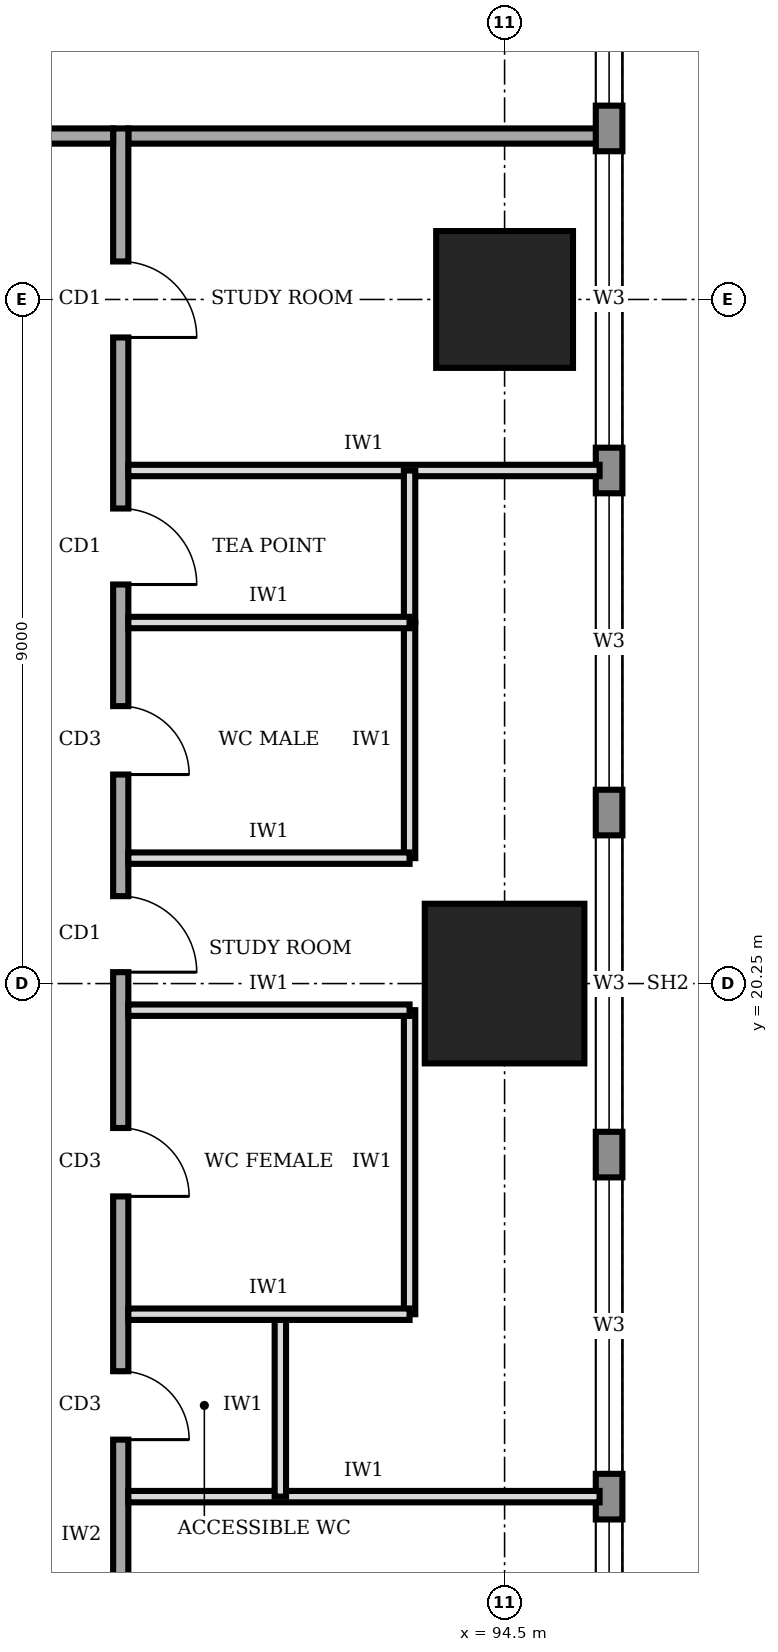
"""IFC4 building model, lengths in metres.
Left out: names, types, materials, properties, quantities, classifications, styles, units other than length and angle.
Written with IfcOpenShell. Run it as: python <this file> out.ifc"""

import sys

from ifc_helpers import new_model, si_unit, direction, frame, frame_2d, origin, origin_2d, place, context, subcontext, project, spatial, rectangle, extrude, element, fill, save


model = new_model("IFC4")
c1 = context("Model", 3, precision=1e-05, world=origin(), true_north=direction((0.0, 1.0)))
c2 = subcontext(c1, "Body", "Model", "MODEL_VIEW")
j1 = project(units=[si_unit("LENGTHUNIT", "METRE"), si_unit("PLANEANGLEUNIT", "RADIAN")], contexts=[c1])
p1 = place(None, origin())
s1 = spatial("IfcSite", under=j1, at=p1, CompositionType="ELEMENT")
p2 = place(p1, origin())
s2 = spatial("IfcBuilding", under=s1, at=p2, CompositionType="ELEMENT")
p3 = place(p2, frame((0.0, 0.0, 201.0)))
s3 = spatial("IfcBuildingStorey", under=s2, at=p3, CompositionType="ELEMENT", Elevation=201.0)
p4 = place(p3, frame((94.5, 20.25, 0.0), z_axis=(0.0, 0.0, 1.0), x_axis=(1.0, 0.0, 0.0)))
e1 = element("IfcColumn", 1, at=p4, inside=s3, PredefinedType="COLUMN", context=c2, shape_type="SweptSolid", body=[
    extrude(rectangle(XDim=2.1, YDim=2.1, at=origin_2d()), origin(), (0.0, 0.0, 1.0), 4.0),
])
p5 = place(p3, frame((94.5, 29.25, 0.0), z_axis=(0.0, 0.0, 1.0), x_axis=(1.0, 0.0, 0.0)))
e2 = element("IfcColumn", 2, at=p5, inside=s3, PredefinedType="COLUMN", context=c2, shape_type="SweptSolid", body=[
    extrude(rectangle(XDim=1.8, YDim=1.8, at=origin_2d()), origin(), (0.0, 0.0, 1.0), 4.0),
])
p6 = place(p3, frame((95.875, 3.32, 0.0), z_axis=(0.0, 0.0, 1.0), x_axis=(0.0, 1.0, 0.0)))
e3 = element("IfcWall", 3, at=p6, inside=s3, PredefinedType="STANDARD", context=c2, shape_type="SweptSolid", body=[
    extrude(rectangle(XDim=33.86, YDim=0.35, at=frame_2d((16.93, 0.0))), origin(), (0.0, 0.0, 1.0), 3.75),
])
p7 = place(p6, frame((1.48, 0.0, 0.95)))
e4 = element("IfcOpeningElement", 4, at=p7, cuts=e3, PredefinedType="OPENING", context=c2, shape_type="SweptSolid", body=[
    extrude(rectangle(XDim=3.9, YDim=1.8, at=frame_2d((1.95, 0.9))), frame((0.0, 0.185, 0.0), z_axis=(0.0, -1.0, 0.0), x_axis=(1.0, 0.0, 0.0)), (0.0, 0.0, 1.0), 0.37),
])
p8 = place(p6, frame((5.98, 0.0, 0.95)))
e5 = element("IfcOpeningElement", 5, at=p8, cuts=e3, PredefinedType="OPENING", context=c2, shape_type="SweptSolid", body=[
    extrude(rectangle(XDim=3.9, YDim=1.8, at=frame_2d((1.95, 0.9))), frame((0.0, 0.185, 0.0), z_axis=(0.0, -1.0, 0.0), x_axis=(1.0, 0.0, 0.0)), (0.0, 0.0, 1.0), 0.37),
])
p9 = place(p6, frame((10.48, 0.0, 0.95)))
e6 = element("IfcOpeningElement", 6, at=p9, cuts=e3, PredefinedType="OPENING", context=c2, shape_type="SweptSolid", body=[
    extrude(rectangle(XDim=3.9, YDim=1.8, at=frame_2d((1.95, 0.9))), frame((0.0, 0.185, 0.0), z_axis=(0.0, -1.0, 0.0), x_axis=(1.0, 0.0, 0.0)), (0.0, 0.0, 1.0), 0.37),
])
p10 = place(p6, frame((14.98, 0.0, 0.95)))
e7 = element("IfcOpeningElement", 7, at=p10, cuts=e3, PredefinedType="OPENING", context=c2, shape_type="SweptSolid", body=[
    extrude(rectangle(XDim=3.9, YDim=1.8, at=frame_2d((1.95, 0.9))), frame((0.0, 0.185, 0.0), z_axis=(0.0, -1.0, 0.0), x_axis=(1.0, 0.0, 0.0)), (0.0, 0.0, 1.0), 0.37),
])
p11 = place(p6, frame((19.48, 0.0, 0.95)))
e8 = element("IfcOpeningElement", 8, at=p11, cuts=e3, PredefinedType="OPENING", context=c2, shape_type="SweptSolid", body=[
    extrude(rectangle(XDim=3.9, YDim=1.8, at=frame_2d((1.95, 0.9))), frame((0.0, 0.185, 0.0), z_axis=(0.0, -1.0, 0.0), x_axis=(1.0, 0.0, 0.0)), (0.0, 0.0, 1.0), 0.37),
])
p12 = place(p6, frame((23.98, 0.0, 0.95)))
e9 = element("IfcOpeningElement", 9, at=p12, cuts=e3, PredefinedType="OPENING", context=c2, shape_type="SweptSolid", body=[
    extrude(rectangle(XDim=3.9, YDim=1.8, at=frame_2d((1.95, 0.9))), frame((0.0, 0.185, 0.0), z_axis=(0.0, -1.0, 0.0), x_axis=(1.0, 0.0, 0.0)), (0.0, 0.0, 1.0), 0.37),
])
p13 = place(p6, frame((28.48, 0.0, 0.95)))
e10 = element("IfcOpeningElement", 10, at=p13, cuts=e3, PredefinedType="OPENING", context=c2, shape_type="SweptSolid", body=[
    extrude(rectangle(XDim=3.9, YDim=1.8, at=frame_2d((1.95, 0.9))), frame((0.0, 0.185, 0.0), z_axis=(0.0, -1.0, 0.0), x_axis=(1.0, 0.0, 0.0)), (0.0, 0.0, 1.0), 0.37),
])
p14 = place(p3, frame((89.45, 9.2, 0.0), z_axis=(0.0, 0.0, 1.0), x_axis=(0.0, 1.0, 0.0)))
e11 = element("IfcWall", 11, at=p14, inside=s3, PredefinedType="SOLIDWALL", context=c2, shape_type="SweptSolid", body=[
    extrude(rectangle(XDim=22.3, YDim=0.2, at=frame_2d((11.15, 0.0))), origin(), (0.0, 0.0, 1.0), 3.75),
])
p15 = place(p14, frame((1.55, 0.0, 0.0)))
e12 = element("IfcOpeningElement", 12, at=p15, cuts=e11, PredefinedType="OPENING", context=c2, shape_type="SweptSolid", body=[
    extrude(rectangle(XDim=1.0, YDim=2.1, at=frame_2d((0.5, 1.05))), frame((0.0, 0.11, 0.0), z_axis=(0.0, -1.0, 0.0), x_axis=(1.0, 0.0, 0.0)), (0.0, 0.0, 1.0), 0.22),
])
p16 = place(p14, frame((5.05, 0.0, 0.0)))
e13 = element("IfcOpeningElement", 13, at=p16, cuts=e11, PredefinedType="OPENING", context=c2, shape_type="SweptSolid", body=[
    extrude(rectangle(XDim=0.9, YDim=2.1, at=frame_2d((0.45, 1.05))), frame((0.0, 0.11, 0.0), z_axis=(0.0, -1.0, 0.0), x_axis=(1.0, 0.0, 0.0)), (0.0, 0.0, 1.0), 0.22),
])
p17 = place(p14, frame((8.25, 0.0, 0.0)))
e14 = element("IfcOpeningElement", 14, at=p17, cuts=e11, PredefinedType="OPENING", context=c2, shape_type="SweptSolid", body=[
    extrude(rectangle(XDim=0.9, YDim=2.1, at=frame_2d((0.45, 1.05))), frame((0.0, 0.11, 0.0), z_axis=(0.0, -1.0, 0.0), x_axis=(1.0, 0.0, 0.0)), (0.0, 0.0, 1.0), 0.22),
])
p18 = place(p14, frame((13.8, 0.0, 0.0)))
e15 = element("IfcOpeningElement", 15, at=p18, cuts=e11, PredefinedType="OPENING", context=c2, shape_type="SweptSolid", body=[
    extrude(rectangle(XDim=0.9, YDim=2.1, at=frame_2d((0.45, 1.05))), frame((0.0, 0.11, 0.0), z_axis=(0.0, -1.0, 0.0), x_axis=(1.0, 0.0, 0.0)), (0.0, 0.0, 1.0), 0.22),
])
p19 = place(p14, frame((16.3, 0.0, 0.0)))
e16 = element("IfcOpeningElement", 16, at=p19, cuts=e11, PredefinedType="OPENING", context=c2, shape_type="SweptSolid", body=[
    extrude(rectangle(XDim=1.0, YDim=2.1, at=frame_2d((0.5, 1.05))), frame((0.0, 0.11, 0.0), z_axis=(0.0, -1.0, 0.0), x_axis=(1.0, 0.0, 0.0)), (0.0, 0.0, 1.0), 0.22),
])
p20 = place(p14, frame((11.2, 0.0, 0.0)))
e17 = element("IfcOpeningElement", 17, at=p20, cuts=e11, PredefinedType="OPENING", context=c2, shape_type="SweptSolid", body=[
    extrude(rectangle(XDim=1.0, YDim=2.1, at=frame_2d((0.5, 1.05))), frame((0.0, 0.11, 0.0), z_axis=(0.0, -1.0, 0.0), x_axis=(1.0, 0.0, 0.0)), (0.0, 0.0, 1.0), 0.22),
])
p21 = place(p14, frame((19.55, 0.0, 0.0)))
e18 = element("IfcOpeningElement", 18, at=p21, cuts=e11, PredefinedType="OPENING", context=c2, shape_type="SweptSolid", body=[
    extrude(rectangle(XDim=1.0, YDim=2.1, at=frame_2d((0.5, 1.05))), frame((0.0, 0.11, 0.0), z_axis=(0.0, -1.0, 0.0), x_axis=(1.0, 0.0, 0.0)), (0.0, 0.0, 1.0), 0.22),
])
p22 = place(p3, frame((89.35, 31.4, 0.0), z_axis=(0.0, 0.0, 1.0), x_axis=(-1.0, 0.0, 0.0)))
e19 = element("IfcWall", 19, at=p22, inside=s3, PredefinedType="SOLIDWALL", context=c2, shape_type="SweptSolid", body=[
    extrude(rectangle(XDim=16.9, YDim=0.2, at=frame_2d((8.45, 0.0))), origin(), (0.0, 0.0, 1.0), 3.75),
])
p23 = place(p22, frame((12.125, 0.0, 0.0)))
e20 = element("IfcOpeningElement", 20, at=p23, cuts=e19, PredefinedType="OPENING", context=c2, shape_type="SweptSolid", body=[
    extrude(rectangle(XDim=1.0, YDim=2.1, at=frame_2d((0.5, 1.05))), frame((0.0, 0.11, 0.0), z_axis=(0.0, -1.0, 0.0), x_axis=(1.0, 0.0, 0.0)), (0.0, 0.0, 1.0), 0.22),
])
p24 = place(p22, frame((5.6, 0.0, 0.0)))
e21 = element("IfcOpeningElement", 21, at=p24, cuts=e19, PredefinedType="OPENING", context=c2, shape_type="SweptSolid", body=[
    extrude(rectangle(XDim=1.0, YDim=2.1, at=frame_2d((0.5, 1.05))), frame((0.0, 0.11, 0.0), z_axis=(0.0, -1.0, 0.0), x_axis=(1.0, 0.0, 0.0)), (0.0, 0.0, 1.0), 0.22),
])
p25 = place(p22, frame((1.325, 0.0, 0.0)))
e22 = element("IfcOpeningElement", 22, at=p25, cuts=e19, PredefinedType="OPENING", context=c2, shape_type="SweptSolid", body=[
    extrude(rectangle(XDim=1.0, YDim=2.1, at=frame_2d((0.5, 1.05))), frame((0.0, 0.11, 0.0), z_axis=(0.0, -1.0, 0.0), x_axis=(1.0, 0.0, 0.0)), (0.0, 0.0, 1.0), 0.22),
])
p26 = place(p3, frame((89.55, 31.4, 0.0), z_axis=(0.0, 0.0, 1.0), x_axis=(1.0, 0.0, 0.0)))
e23 = element("IfcWall", 23, at=p26, inside=s3, PredefinedType="SOLIDWALL", context=c2, shape_type="SweptSolid", body=[
    extrude(rectangle(XDim=6.2, YDim=0.2, at=frame_2d((3.1, 0.0))), origin(), (0.0, 0.0, 1.0), 3.75),
])
for number, where, z_axis, x_axis in (
    (24, (89.55, 13.5, 0.0), (0.0, 0.0, 1.0), (1.0, 0.0, 0.0)),
    (25, (89.55, 27.0, 0.0), (0.0, 0.0, 1.0), (1.0, 0.0, 0.0)),
):
    element("IfcWall", number, at=place(p3, frame(where, z_axis=z_axis, x_axis=x_axis)), inside=s3, PredefinedType="PARTITIONING", context=c2, shape_type="SweptSolid", body=[
        extrude(rectangle(XDim=6.2, YDim=0.15, at=frame_2d((3.1, 0.0))), origin(), (0.0, 0.0, 1.0), 3.75),
    ])
p27 = place(p3, frame((89.55, 15.9, 0.0), z_axis=(0.0, 0.0, 1.0), x_axis=(1.0, 0.0, 0.0)))
e26 = element("IfcWall", 26, at=p27, inside=s3, PredefinedType="PARTITIONING", context=c2, shape_type="SweptSolid", body=[
    extrude(rectangle(XDim=3.7, YDim=0.15, at=frame_2d((1.85, 0.0))), origin(), (0.0, 0.0, 1.0), 3.75),
])
p28 = place(p3, frame((89.55, 19.9, 0.0), z_axis=(0.0, 0.0, 1.0), x_axis=(1.0, 0.0, 0.0)))
e27 = element("IfcWall", 27, at=p28, inside=s3, PredefinedType="PARTITIONING", context=c2, shape_type="SweptSolid", body=[
    extrude(rectangle(XDim=3.7, YDim=0.15, at=frame_2d((1.85, 0.0))), origin(), (0.0, 0.0, 1.0), 2.85),
])
for number, where, z_axis, x_axis in (
    (28, (89.55, 21.9, 0.0), (0.0, 0.0, 1.0), (1.0, 0.0, 0.0)),
    (29, (89.55, 25.0, 0.0), (0.0, 0.0, 1.0), (1.0, 0.0, 0.0)),
):
    element("IfcWall", number, at=place(p3, frame(where, z_axis=z_axis, x_axis=x_axis)), inside=s3, PredefinedType="PARTITIONING", context=c2, shape_type="SweptSolid", body=[
        extrude(rectangle(XDim=3.7, YDim=0.15, at=frame_2d((1.85, 0.0))), origin(), (0.0, 0.0, 1.0), 3.75),
    ])
p29 = place(p3, frame((91.55, 13.5, 0.0), z_axis=(0.0, 0.0, 1.0), x_axis=(0.0, 1.0, 0.0)))
e30 = element("IfcWall", 30, at=p29, inside=s3, PredefinedType="PARTITIONING", context=c2, shape_type="SweptSolid", body=[
    extrude(rectangle(XDim=2.4, YDim=0.15, at=frame_2d((1.2, 0.0))), origin(), (0.0, 0.0, 1.0), 3.75),
])
p30 = place(p3, frame((93.25, 15.9, 0.0), z_axis=(0.0, 0.0, 1.0), x_axis=(0.0, 1.0, 0.0)))
e31 = element("IfcWall", 31, at=p30, inside=s3, PredefinedType="PARTITIONING", context=c2, shape_type="SweptSolid", body=[
    extrude(rectangle(XDim=4.0, YDim=0.15, at=frame_2d((2.0, 0.0))), origin(), (0.0, 0.0, 1.0), 3.75),
])
p31 = place(p3, frame((93.25, 21.9, 0.0), z_axis=(0.0, 0.0, 1.0), x_axis=(0.0, 1.0, 0.0)))
e32 = element("IfcWall", 32, at=p31, inside=s3, PredefinedType="PARTITIONING", context=c2, shape_type="SweptSolid", body=[
    extrude(rectangle(XDim=3.1, YDim=0.15, at=frame_2d((1.55, 0.0))), origin(), (0.0, 0.0, 1.0), 3.75),
])
p32 = place(p3, frame((93.25, 25.0, 0.0), z_axis=(0.0, 0.0, 1.0), x_axis=(0.0, 1.0, 0.0)))
e33 = element("IfcWall", 33, at=p32, inside=s3, PredefinedType="PARTITIONING", context=c2, shape_type="SweptSolid", body=[
    extrude(rectangle(XDim=2.0, YDim=0.15, at=frame_2d((1.0, 0.0))), origin(), (0.0, 0.0, 1.0), 3.75),
])
p33 = place(p8, origin())
e34 = element("IfcWindow", 34, at=p33, inside=s3, PartitioningType="SINGLE_PANEL", PredefinedType="WINDOW", context=c2, shape_type="SweptSolid", body=[
    extrude(rectangle(XDim=3.9, YDim=1.8, at=frame_2d((1.95, 0.9))), frame((0.0, 0.03, 0.0), z_axis=(0.0, -1.0, 0.0), x_axis=(1.0, 0.0, 0.0)), (0.0, 0.0, 1.0), 0.06),
])
fill(e5, e34)
p34 = place(p9, origin())
e35 = element("IfcWindow", 35, at=p34, inside=s3, PartitioningType="SINGLE_PANEL", PredefinedType="WINDOW", context=c2, shape_type="SweptSolid", body=[
    extrude(rectangle(XDim=3.9, YDim=1.8, at=frame_2d((1.95, 0.9))), frame((0.0, 0.03, 0.0), z_axis=(0.0, -1.0, 0.0), x_axis=(1.0, 0.0, 0.0)), (0.0, 0.0, 1.0), 0.06),
])
fill(e6, e35)
p35 = place(p10, origin())
e36 = element("IfcWindow", 36, at=p35, inside=s3, PartitioningType="SINGLE_PANEL", PredefinedType="WINDOW", context=c2, shape_type="SweptSolid", body=[
    extrude(rectangle(XDim=3.9, YDim=1.8, at=frame_2d((1.95, 0.9))), frame((0.0, 0.03, 0.0), z_axis=(0.0, -1.0, 0.0), x_axis=(1.0, 0.0, 0.0)), (0.0, 0.0, 1.0), 0.06),
])
fill(e7, e36)
p36 = place(p11, origin())
e37 = element("IfcWindow", 37, at=p36, inside=s3, PartitioningType="SINGLE_PANEL", PredefinedType="WINDOW", context=c2, shape_type="SweptSolid", body=[
    extrude(rectangle(XDim=3.9, YDim=1.8, at=frame_2d((1.95, 0.9))), frame((0.0, 0.03, 0.0), z_axis=(0.0, -1.0, 0.0), x_axis=(1.0, 0.0, 0.0)), (0.0, 0.0, 1.0), 0.06),
])
fill(e8, e37)
p37 = place(p12, origin())
e38 = element("IfcWindow", 38, at=p37, inside=s3, PartitioningType="SINGLE_PANEL", PredefinedType="WINDOW", context=c2, shape_type="SweptSolid", body=[
    extrude(rectangle(XDim=3.9, YDim=1.8, at=frame_2d((1.95, 0.9))), frame((0.0, 0.03, 0.0), z_axis=(0.0, -1.0, 0.0), x_axis=(1.0, 0.0, 0.0)), (0.0, 0.0, 1.0), 0.06),
])
fill(e9, e38)
p38 = place(p13, origin())
e39 = element("IfcWindow", 39, at=p38, inside=s3, PartitioningType="SINGLE_PANEL", PredefinedType="WINDOW", context=c2, shape_type="SweptSolid", body=[
    extrude(rectangle(XDim=3.9, YDim=1.8, at=frame_2d((1.95, 0.9))), frame((0.0, 0.03, 0.0), z_axis=(0.0, -1.0, 0.0), x_axis=(1.0, 0.0, 0.0)), (0.0, 0.0, 1.0), 0.06),
])
fill(e10, e39)
p39 = place(p16, frame((0.9, 0.0, 0.0), z_axis=(0.0, 0.0, 1.0), x_axis=(-1.0, 0.0, 0.0)))
e40 = element("IfcDoor", 40, at=p39, inside=s3, OperationType="SINGLE_SWING_RIGHT", PredefinedType="DOOR", context=c2, shape_type="SweptSolid", body=[
    extrude(rectangle(XDim=0.9, YDim=2.1, at=frame_2d((0.45, 1.05))), frame((0.0, 0.025, 0.0), z_axis=(0.0, -1.0, 0.0), x_axis=(1.0, 0.0, 0.0)), (0.0, 0.0, 1.0), 0.05),
])
fill(e13, e40)
p40 = place(p17, frame((0.9, 0.0, 0.0), z_axis=(0.0, 0.0, 1.0), x_axis=(-1.0, 0.0, 0.0)))
e41 = element("IfcDoor", 41, at=p40, inside=s3, OperationType="SINGLE_SWING_RIGHT", PredefinedType="DOOR", context=c2, shape_type="SweptSolid", body=[
    extrude(rectangle(XDim=0.9, YDim=2.1, at=frame_2d((0.45, 1.05))), frame((0.0, 0.025, 0.0), z_axis=(0.0, -1.0, 0.0), x_axis=(1.0, 0.0, 0.0)), (0.0, 0.0, 1.0), 0.05),
])
fill(e14, e41)
p41 = place(p18, frame((0.9, 0.0, 0.0), z_axis=(0.0, 0.0, 1.0), x_axis=(-1.0, 0.0, 0.0)))
e42 = element("IfcDoor", 42, at=p41, inside=s3, OperationType="SINGLE_SWING_RIGHT", PredefinedType="DOOR", context=c2, shape_type="SweptSolid", body=[
    extrude(rectangle(XDim=0.9, YDim=2.1, at=frame_2d((0.45, 1.05))), frame((0.0, 0.025, 0.0), z_axis=(0.0, -1.0, 0.0), x_axis=(1.0, 0.0, 0.0)), (0.0, 0.0, 1.0), 0.05),
])
fill(e15, e42)
p42 = place(p19, frame((1.0, 0.0, 0.0), z_axis=(0.0, 0.0, 1.0), x_axis=(-1.0, 0.0, 0.0)))
e43 = element("IfcDoor", 43, at=p42, inside=s3, OperationType="SINGLE_SWING_RIGHT", PredefinedType="DOOR", context=c2, shape_type="SweptSolid", body=[
    extrude(rectangle(XDim=1.0, YDim=2.1, at=frame_2d((0.5, 1.05))), frame((0.0, 0.025, 0.0), z_axis=(0.0, -1.0, 0.0), x_axis=(1.0, 0.0, 0.0)), (0.0, 0.0, 1.0), 0.05),
])
fill(e16, e43)
p43 = place(p20, frame((1.0, 0.0, 0.0), z_axis=(0.0, 0.0, 1.0), x_axis=(-1.0, 0.0, 0.0)))
e44 = element("IfcDoor", 44, at=p43, inside=s3, OperationType="SINGLE_SWING_RIGHT", PredefinedType="DOOR", context=c2, shape_type="SweptSolid", body=[
    extrude(rectangle(XDim=1.0, YDim=2.1, at=frame_2d((0.5, 1.05))), frame((0.0, 0.025, 0.0), z_axis=(0.0, -1.0, 0.0), x_axis=(1.0, 0.0, 0.0)), (0.0, 0.0, 1.0), 0.05),
])
fill(e17, e44)
p44 = place(p21, frame((1.0, 0.0, 0.0), z_axis=(0.0, 0.0, 1.0), x_axis=(-1.0, 0.0, 0.0)))
e45 = element("IfcDoor", 45, at=p44, inside=s3, OperationType="SINGLE_SWING_RIGHT", PredefinedType="DOOR", context=c2, shape_type="SweptSolid", body=[
    extrude(rectangle(XDim=1.0, YDim=2.1, at=frame_2d((0.5, 1.05))), frame((0.0, 0.025, 0.0), z_axis=(0.0, -1.0, 0.0), x_axis=(1.0, 0.0, 0.0)), (0.0, 0.0, 1.0), 0.05),
])
fill(e18, e45)
save(model, sys.argv[1])
